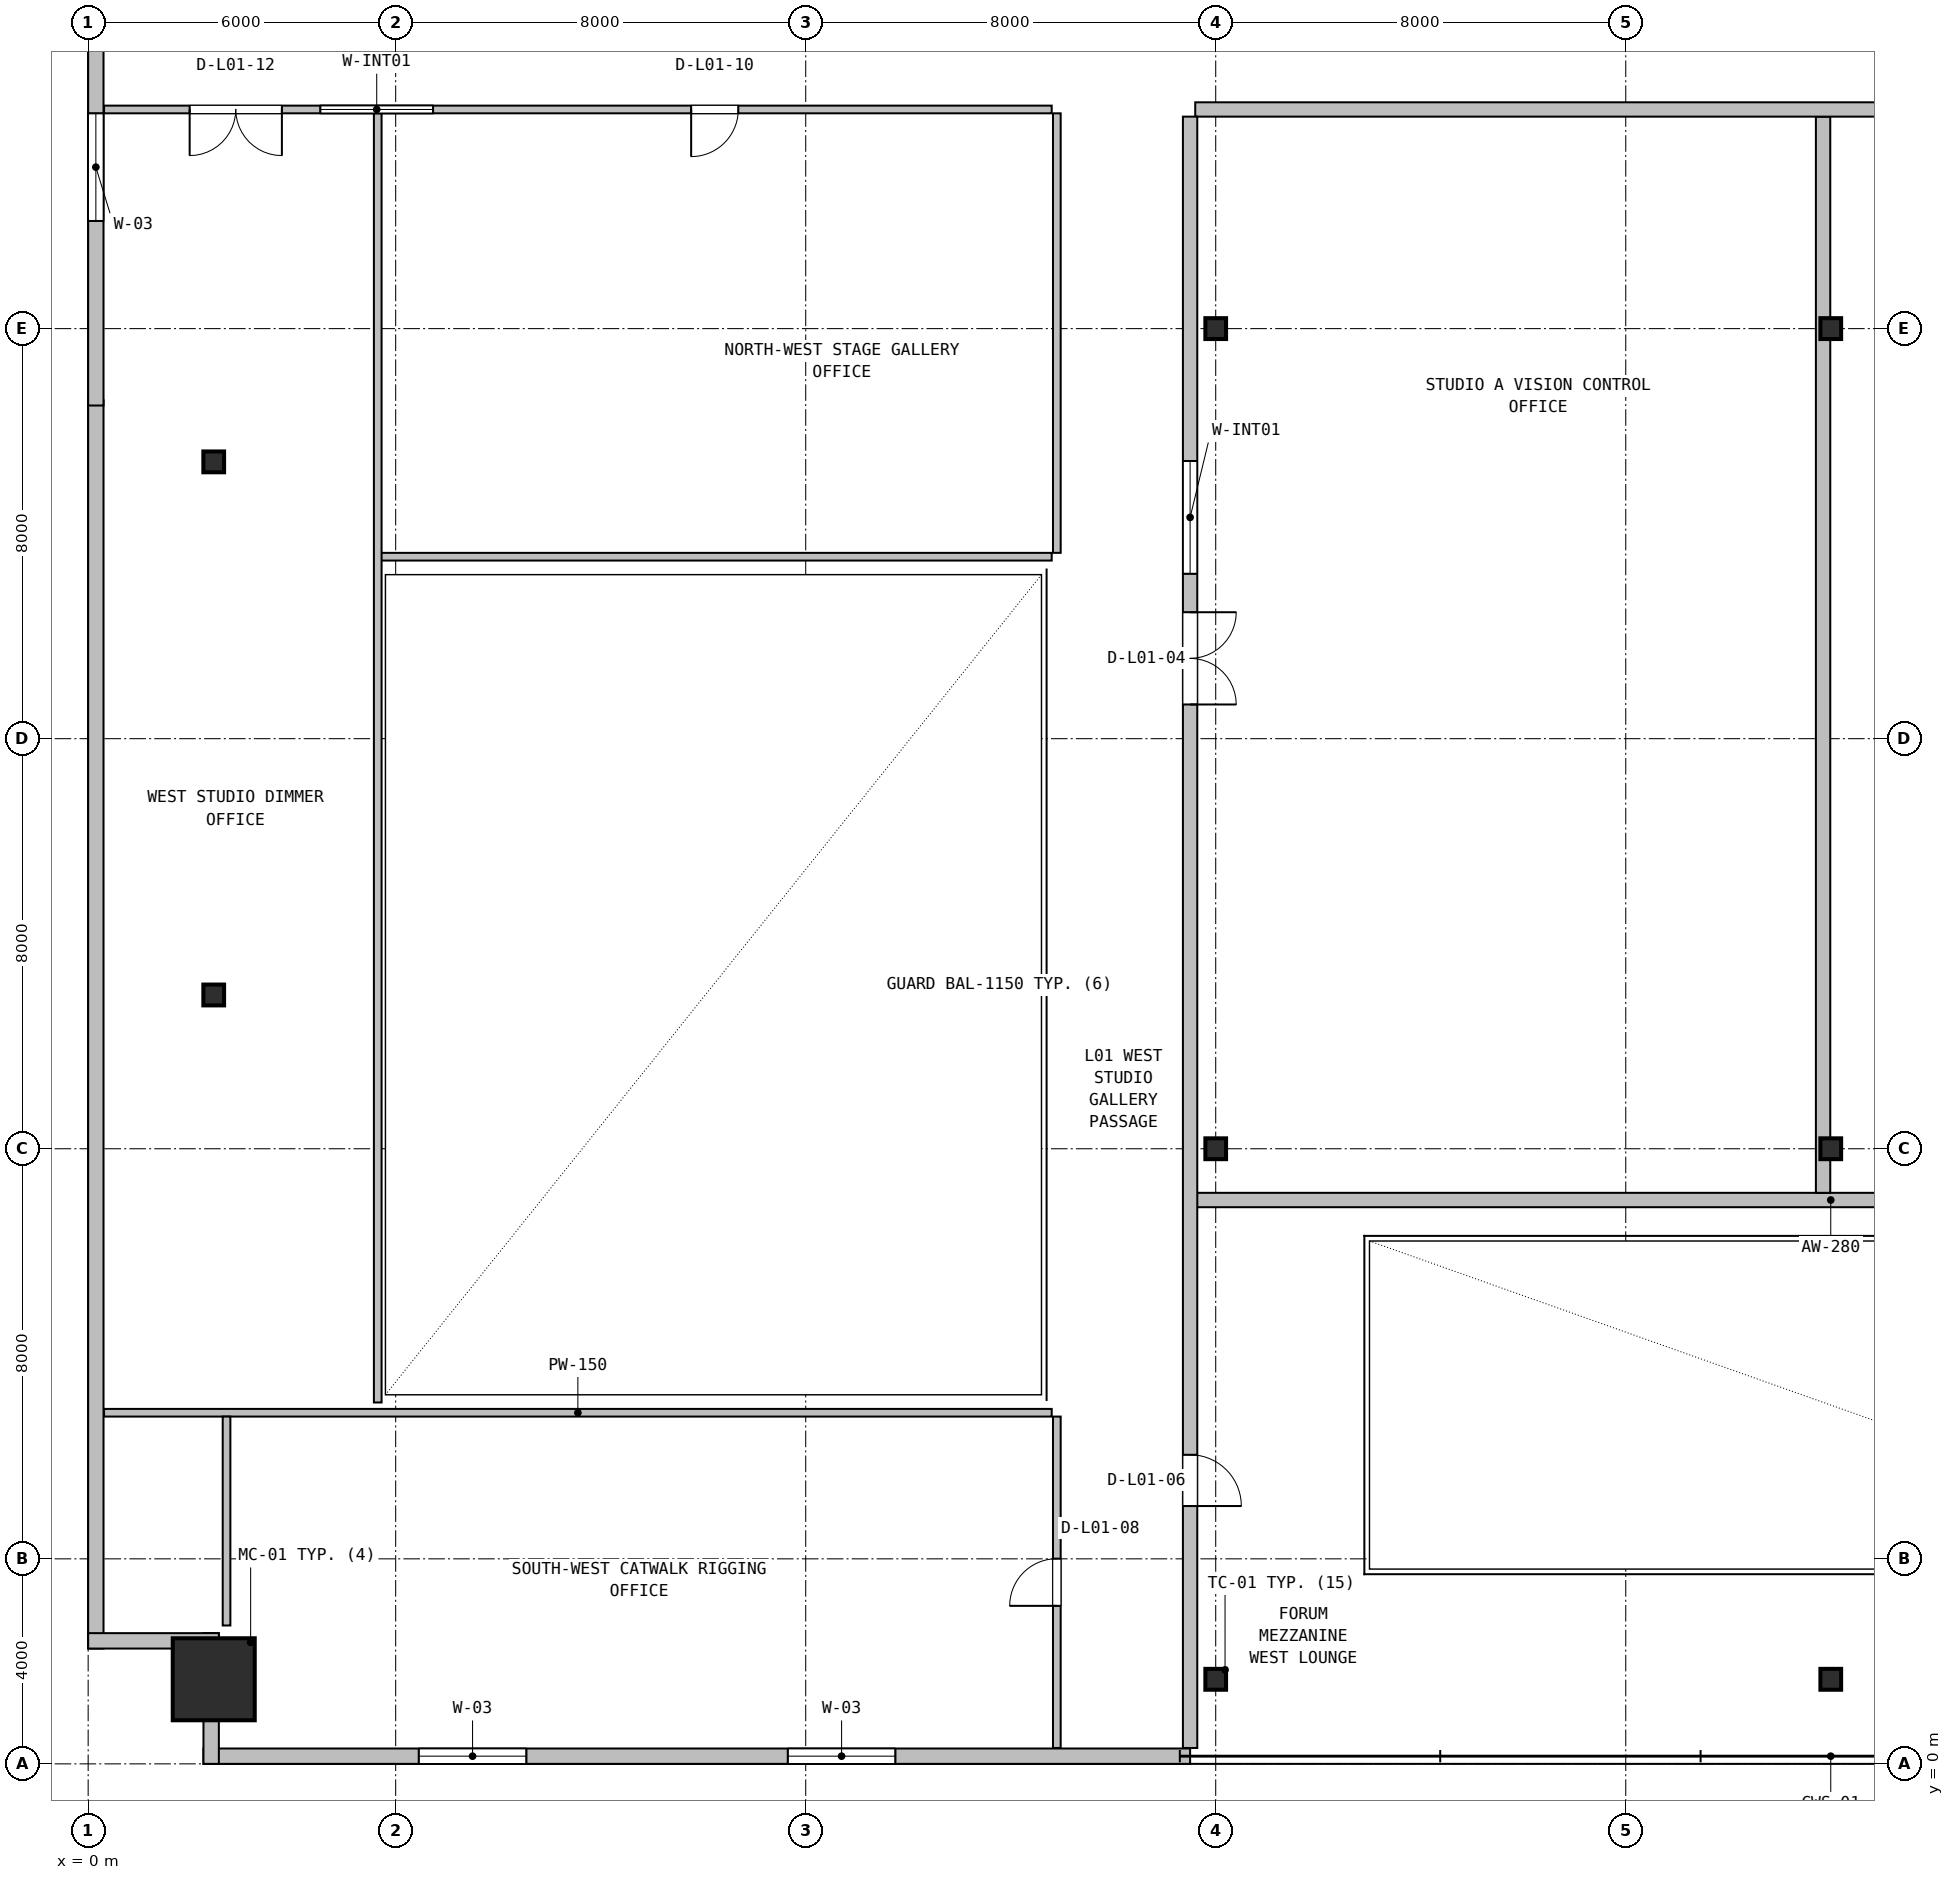
"""IFC4 building model, lengths in metres.
Left out: names, types, materials, properties, quantities, classifications, styles, units other than length and angle.
Written with IfcOpenShell. Run it as: python <this file> out.ifc"""

import sys

from ifc_helpers import new_model, si_unit, direction, frame, frame_2d, origin, origin_2d, place, context, subcontext, project, spatial, rectangle, hollow_rectangle, i_section, extrude, source, transform, mapped, element, fill, save


model = new_model("IFC4")
c1 = context("Model", 3, precision=1e-05, world=origin(), true_north=direction((0.0, 1.0)))
c2 = subcontext(c1, "Body", "Model", "MODEL_VIEW")
j1 = project(units=[si_unit("LENGTHUNIT", "METRE"), si_unit("PLANEANGLEUNIT", "RADIAN")], contexts=[c1])
p1 = place(None, origin())
s1 = spatial("IfcSite", under=j1, at=p1, CompositionType="ELEMENT")
p2 = place(p1, origin())
s2 = spatial("IfcBuilding", under=s1, at=p2, CompositionType="ELEMENT")
p3 = place(p2, frame((0.0, 0.0, 6.0)))
s3 = spatial("IfcBuildingStorey", under=s2, at=p3, CompositionType="ELEMENT", Elevation=6.0)
m1 = source(origin(), c2, "Body", "SweptSolid", [
    extrude(hollow_rectangle(XDim=1.6, YDim=1.6, WallThickness=0.06, at=origin_2d()), origin(), (0.0, 0.0, 1.0), 5.4),
])
p4 = place(p3, frame((2.45, 1.65, 0.0), z_axis=(0.0, 0.0, 1.0), x_axis=(1.0, 0.0, 0.0)))
e1 = element("IfcColumn", 1, at=p4, inside=s3, PredefinedType="COLUMN", context=c2, shape_type="MappedRepresentation", body=[
    mapped(m1, transform((0.0, 0.0, 0.0), x_axis=(1.0, 0.0, 0.0), y_axis=(0.0, 1.0, 0.0), z_axis=(0.0, 0.0, 1.0), scale=1.0)),
])
m2 = source(origin(), c2, "Body", "SweptSolid", [
    extrude(i_section(OverallWidth=0.404, OverallDepth=0.407, WebThickness=0.027, FlangeThickness=0.044, FilletRadius=0.018, at=origin_2d()), origin(), (0.0, 0.0, 1.0), 5.4),
])
for number, where, z_axis, x_axis in (
    (2, (22.0, 1.65, 0.0), (0.0, 0.0, 1.0), (1.0, 0.0, 0.0)),
    (3, (34.0, 1.65, 0.0), (0.0, 0.0, 1.0), (1.0, 0.0, 0.0)),
    (4, (22.0, 12.0, 0.0), (0.0, 0.0, 1.0), (1.0, 0.0, 0.0)),
    (5, (34.0, 12.0, 0.0), (0.0, 0.0, 1.0), (1.0, 0.0, 0.0)),
    (6, (22.0, 28.0, 0.0), (0.0, 0.0, 1.0), (1.0, 0.0, 0.0)),
    (7, (34.0, 28.0, 0.0), (0.0, 0.0, 1.0), (1.0, 0.0, 0.0)),
    (8, (2.45, 15.0, 0.0), (0.0, 0.0, 1.0), (1.0, 0.0, 0.0)),
    (9, (2.45, 25.4, 0.0), (0.0, 0.0, 1.0), (1.0, 0.0, 0.0)),
):
    element("IfcColumn", number, at=place(p3, frame(where, z_axis=z_axis, x_axis=x_axis)), inside=s3, PredefinedType="COLUMN", context=c2, shape_type="MappedRepresentation", body=[
        mapped(m2, transform((0.0, 0.0, 0.0), x_axis=(1.0, 0.0, 0.0), y_axis=(0.0, 1.0, 0.0), z_axis=(0.0, 0.0, 1.0), scale=1.0)),
    ])
p5 = place(p3, frame((2.25, 0.15, 0.0), z_axis=(0.0, 0.0, 1.0), x_axis=(1.0, 0.0, 0.0)))
e10 = element("IfcWall", 10, at=p5, inside=s3, PredefinedType="SOLIDWALL", context=c2, shape_type="SweptSolid", body=[
    extrude(rectangle(XDim=19.25, YDim=0.3, at=frame_2d((9.625, 0.0))), origin(), (0.0, 0.0, 1.0), 5.1),
])
p6 = place(p5, frame((4.2, 0.0, 0.9)))
e11 = element("IfcOpeningElement", 11, at=p6, cuts=e10, PredefinedType="OPENING", context=c2, shape_type="SweptSolid", body=[
    extrude(rectangle(XDim=2.1, YDim=2.1, at=frame_2d((1.05, 1.05))), frame((0.0, 0.16, 0.0), z_axis=(0.0, -1.0, 0.0), x_axis=(1.0, 0.0, 0.0)), (0.0, 0.0, 1.0), 0.32),
])
p7 = place(p5, frame((11.4, 0.0, 0.9)))
e12 = element("IfcOpeningElement", 12, at=p7, cuts=e10, PredefinedType="OPENING", context=c2, shape_type="SweptSolid", body=[
    extrude(rectangle(XDim=2.1, YDim=2.1, at=frame_2d((1.05, 1.05))), frame((0.0, 0.16, 0.0), z_axis=(0.0, -1.0, 0.0), x_axis=(1.0, 0.0, 0.0)), (0.0, 0.0, 1.0), 0.32),
])
p8 = place(p3, frame((0.15, 2.25, 0.0), z_axis=(0.0, 0.0, 1.0), x_axis=(0.0, 1.0, 0.0)))
e13 = element("IfcWall", 13, at=p8, inside=s3, PredefinedType="SOLIDWALL", context=c2, shape_type="SweptSolid", body=[
    extrude(rectangle(XDim=24.35, YDim=0.3, at=frame_2d((12.175, 0.0))), origin(), (0.0, 0.0, 1.0), 5.1),
])
p9 = place(p3, frame((0.15, 26.5, 0.0), z_axis=(0.0, 0.0, 1.0), x_axis=(0.0, 1.0, 0.0)))
e14 = element("IfcWall", 14, at=p9, inside=s3, PredefinedType="SOLIDWALL", context=c2, shape_type="SweptSolid", body=[
    extrude(rectangle(XDim=19.25, YDim=0.3, at=frame_2d((9.625, 0.0))), origin(), (0.0, 0.0, 1.0), 5.1),
])
p10 = place(p9, frame((3.6, 0.0, 0.9)))
e15 = element("IfcOpeningElement", 15, at=p10, cuts=e14, PredefinedType="OPENING", context=c2, shape_type="SweptSolid", body=[
    extrude(rectangle(XDim=2.1, YDim=2.1, at=frame_2d((1.05, 1.05))), frame((0.0, 0.16, 0.0), z_axis=(0.0, -1.0, 0.0), x_axis=(1.0, 0.0, 0.0)), (0.0, 0.0, 1.0), 0.32),
])
p11 = place(p9, frame((12.8, 0.0, 0.9)))
e16 = element("IfcOpeningElement", 16, at=p11, cuts=e14, PredefinedType="OPENING", context=c2, shape_type="SweptSolid", body=[
    extrude(rectangle(XDim=2.1, YDim=2.1, at=frame_2d((1.05, 1.05))), frame((0.0, 0.16, 0.0), z_axis=(0.0, -1.0, 0.0), x_axis=(1.0, 0.0, 0.0)), (0.0, 0.0, 1.0), 0.32),
])
for number, where, z_axis, x_axis in (
    (17, (2.4, 0.0, 0.0), (0.0, 0.0, 1.0), (0.0, 1.0, 0.0)),
    (18, (0.0, 2.4, 0.0), (0.0, 0.0, 1.0), (1.0, 0.0, 0.0)),
):
    element("IfcWall", number, at=place(p3, frame(where, z_axis=z_axis, x_axis=x_axis)), inside=s3, PredefinedType="SOLIDWALL", context=c2, shape_type="SweptSolid", body=[
        extrude(rectangle(XDim=2.55, YDim=0.3, at=frame_2d((1.275, 0.0))), origin(), (0.0, 0.0, 1.0), 4.183),
    ])
p12 = place(p3, frame((21.6, 11.0, 0.0), z_axis=(0.0, 0.0, 1.0), x_axis=(1.0, 0.0, 0.0)))
e19 = element("IfcWall", 19, at=p12, inside=s3, PredefinedType="SOLIDWALL", context=c2, shape_type="SweptSolid", body=[
    extrude(rectangle(XDim=24.8, YDim=0.28, at=frame_2d((12.4, 0.0))), origin(), (0.0, 0.0, 1.0), 4.183),
])
p13 = place(p3, frame((33.85, 11.14, 0.0), z_axis=(0.0, 0.0, 1.0), x_axis=(0.0, 1.0, 0.0)))
e20 = element("IfcWall", 20, at=p13, inside=s3, PredefinedType="SOLIDWALL", context=c2, shape_type="SweptSolid", body=[
    extrude(rectangle(XDim=20.995, YDim=0.28, at=frame_2d((10.498, 0.0))), origin(), (0.0, 0.0, 1.0), 4.183),
])
p14 = place(p3, frame((21.6, 32.275, 0.0), z_axis=(0.0, 0.0, 1.0), x_axis=(1.0, 0.0, 0.0)))
e21 = element("IfcWall", 21, at=p14, inside=s3, PredefinedType="SOLIDWALL", context=c2, shape_type="SweptSolid", body=[
    extrude(rectangle(XDim=24.8, YDim=0.28, at=frame_2d((12.4, 0.0))), origin(), (0.0, 0.0, 1.0), 4.183),
])
p15 = place(p3, frame((21.5, 0.31, 0.0), z_axis=(0.0, 0.0, 1.0), x_axis=(0.0, 1.0, 0.0)))
e22 = element("IfcWall", 22, at=p15, inside=s3, PredefinedType="SOLIDWALL", context=c2, shape_type="SweptSolid", body=[
    extrude(rectangle(XDim=31.825, YDim=0.28, at=frame_2d((15.913, 0.0))), origin(), (0.0, 0.0, 1.0), 4.183),
])
p16 = place(p15, frame((20.357, 0.0, 0.0)))
e23 = element("IfcOpeningElement", 23, at=p16, cuts=e22, PredefinedType="OPENING", context=c2, shape_type="SweptSolid", body=[
    extrude(rectangle(XDim=1.8, YDim=2.25, at=frame_2d((0.9, 1.125))), frame((0.0, 0.15, 0.0), z_axis=(0.0, -1.0, 0.0), x_axis=(1.0, 0.0, 0.0)), (0.0, 0.0, 1.0), 0.3),
])
p17 = place(p15, frame((22.907, 0.0, 0.95)))
e24 = element("IfcOpeningElement", 24, at=p17, cuts=e22, PredefinedType="OPENING", context=c2, shape_type="SweptSolid", body=[
    extrude(rectangle(XDim=2.2, YDim=1.3, at=frame_2d((1.1, 0.65))), frame((0.0, 0.15, 0.0), z_axis=(0.0, -1.0, 0.0), x_axis=(1.0, 0.0, 0.0)), (0.0, 0.0, 1.0), 0.3),
])
p18 = place(p15, frame((4.72, 0.0, 0.0)))
e25 = element("IfcOpeningElement", 25, at=p18, cuts=e22, PredefinedType="OPENING", context=c2, shape_type="SweptSolid", body=[
    extrude(rectangle(XDim=1.0, YDim=2.1, at=frame_2d((0.5, 1.05))), frame((0.0, 0.15, 0.0), z_axis=(0.0, -1.0, 0.0), x_axis=(1.0, 0.0, 0.0)), (0.0, 0.0, 1.0), 0.3),
])
p19 = place(p3, frame((18.9, 0.31, 0.0), z_axis=(0.0, 0.0, 1.0), x_axis=(0.0, 1.0, 0.0)))
e26 = element("IfcWall", 26, at=p19, inside=s3, PredefinedType="PARTITIONING", context=c2, shape_type="SweptSolid", body=[
    extrude(rectangle(XDim=6.465, YDim=0.15, at=frame_2d((3.232, 0.0))), origin(), (0.0, 0.0, 1.0), 4.183),
])
p20 = place(p19, frame((2.773, 0.0, 0.0)))
e27 = element("IfcOpeningElement", 27, at=p20, cuts=e26, PredefinedType="OPENING", context=c2, shape_type="SweptSolid", body=[
    extrude(rectangle(XDim=0.92, YDim=2.08, at=frame_2d((0.46, 1.04))), frame((0.0, 0.085, 0.0), z_axis=(0.0, -1.0, 0.0), x_axis=(1.0, 0.0, 0.0)), (0.0, 0.0, 1.0), 0.17),
])
p21 = place(p3, frame((0.31, 6.85, 0.0), z_axis=(0.0, 0.0, 1.0), x_axis=(1.0, 0.0, 0.0)))
e28 = element("IfcWall", 28, at=p21, inside=s3, PredefinedType="PARTITIONING", context=c2, shape_type="SweptSolid", body=[
    extrude(rectangle(XDim=18.49, YDim=0.15, at=frame_2d((9.245, 0.0))), origin(), (0.0, 0.0, 1.0), 4.183),
])
p22 = place(p3, frame((2.7, 2.7, 0.0), z_axis=(0.0, 0.0, 1.0), x_axis=(0.0, 1.0, 0.0)))
e29 = element("IfcWall", 29, at=p22, inside=s3, PredefinedType="PARTITIONING", context=c2, shape_type="SweptSolid", body=[
    extrude(rectangle(XDim=4.075, YDim=0.15, at=frame_2d((2.038, 0.0))), origin(), (0.0, 0.0, 1.0), 4.183),
])
p23 = place(p3, frame((5.65, 23.55, 0.0), z_axis=(0.0, 0.0, 1.0), x_axis=(1.0, 0.0, 0.0)))
e30 = element("IfcWall", 30, at=p23, inside=s3, PredefinedType="PARTITIONING", context=c2, shape_type="SweptSolid", body=[
    extrude(rectangle(XDim=13.15, YDim=0.15, at=frame_2d((6.575, 0.0))), origin(), (0.0, 0.0, 1.0), 5.1),
])
p24 = place(p3, frame((18.9, 23.625, 0.0), z_axis=(0.0, 0.0, 1.0), x_axis=(0.0, 1.0, 0.0)))
e31 = element("IfcWall", 31, at=p24, inside=s3, PredefinedType="PARTITIONING", context=c2, shape_type="SweptSolid", body=[
    extrude(rectangle(XDim=8.575, YDim=0.15, at=frame_2d((4.288, 0.0))), origin(), (0.0, 0.0, 1.0), 4.183),
])
p25 = place(p3, frame((0.31, 32.275, 0.0), z_axis=(0.0, 0.0, 1.0), x_axis=(1.0, 0.0, 0.0)))
e32 = element("IfcWall", 32, at=p25, inside=s3, PredefinedType="PARTITIONING", context=c2, shape_type="SweptSolid", body=[
    extrude(rectangle(XDim=18.49, YDim=0.15, at=frame_2d((9.245, 0.0))), origin(), (0.0, 0.0, 1.0), 4.183),
])
p26 = place(p25, frame((11.455, 0.0, 0.0)))
e33 = element("IfcOpeningElement", 33, at=p26, cuts=e32, PredefinedType="OPENING", context=c2, shape_type="SweptSolid", body=[
    extrude(rectangle(XDim=0.92, YDim=2.08, at=frame_2d((0.46, 1.04))), frame((0.0, 0.085, 0.0), z_axis=(0.0, -1.0, 0.0), x_axis=(1.0, 0.0, 0.0)), (0.0, 0.0, 1.0), 0.17),
])
p27 = place(p25, frame((1.67, 0.0, 0.0)))
e34 = element("IfcOpeningElement", 34, at=p27, cuts=e32, PredefinedType="OPENING", context=c2, shape_type="SweptSolid", body=[
    extrude(rectangle(XDim=1.8, YDim=2.25, at=frame_2d((0.9, 1.125))), frame((0.0, 0.085, 0.0), z_axis=(0.0, -1.0, 0.0), x_axis=(1.0, 0.0, 0.0)), (0.0, 0.0, 1.0), 0.17),
])
p28 = place(p25, frame((4.22, 0.0, 0.95)))
e35 = element("IfcOpeningElement", 35, at=p28, cuts=e32, PredefinedType="OPENING", context=c2, shape_type="SweptSolid", body=[
    extrude(rectangle(XDim=2.2, YDim=1.3, at=frame_2d((1.1, 0.65))), frame((0.0, 0.085, 0.0), z_axis=(0.0, -1.0, 0.0), x_axis=(1.0, 0.0, 0.0)), (0.0, 0.0, 1.0), 0.17),
])
p29 = place(p3, frame((5.65, 7.05, 0.0), z_axis=(0.0, 0.0, 1.0), x_axis=(0.0, 1.0, 0.0)))
e36 = element("IfcWall", 36, at=p29, inside=s3, PredefinedType="PARTITIONING", context=c2, shape_type="SweptSolid", body=[
    extrude(rectangle(XDim=25.15, YDim=0.15, at=frame_2d((12.575, 0.0))), origin(), (0.0, 0.0, 1.0), 4.183),
])
m3 = source(origin(), c2, "Body", "SweptSolid", [
    extrude(rectangle(XDim=2.1, YDim=2.1, at=frame_2d((1.05, 1.05))), frame((0.0, 0.03, 0.0), z_axis=(0.0, -1.0, 0.0), x_axis=(1.0, 0.0, 0.0)), (0.0, 0.0, 1.0), 0.06),
])
p30 = place(p6, origin())
e37 = element("IfcWindow", 37, at=p30, inside=s3, PartitioningType="DOUBLE_PANEL_VERTICAL", PredefinedType="WINDOW", context=c2, shape_type="MappedRepresentation", body=[
    mapped(m3, transform((0.0, 0.0, 0.0), x_axis=(1.0, 0.0, 0.0), y_axis=(0.0, 1.0, 0.0), z_axis=(0.0, 0.0, 1.0), scale=1.0)),
])
fill(e11, e37)
p31 = place(p7, origin())
e38 = element("IfcWindow", 38, at=p31, inside=s3, PartitioningType="DOUBLE_PANEL_VERTICAL", PredefinedType="WINDOW", context=c2, shape_type="MappedRepresentation", body=[
    mapped(m3, transform((0.0, 0.0, 0.0), x_axis=(1.0, 0.0, 0.0), y_axis=(0.0, 1.0, 0.0), z_axis=(0.0, 0.0, 1.0), scale=1.0)),
])
fill(e12, e38)
p32 = place(p10, origin())
e39 = element("IfcWindow", 39, at=p32, inside=s3, PartitioningType="DOUBLE_PANEL_VERTICAL", PredefinedType="WINDOW", context=c2, shape_type="MappedRepresentation", body=[
    mapped(m3, transform((0.0, 0.0, 0.0), x_axis=(1.0, 0.0, 0.0), y_axis=(0.0, 1.0, 0.0), z_axis=(0.0, 0.0, 1.0), scale=1.0)),
])
fill(e15, e39)
m4 = source(origin(), c2, "Body", "SweptSolid", [
    extrude(rectangle(XDim=1.8, YDim=2.25, at=frame_2d((0.9, 1.125))), frame((0.0, 0.025, 0.0), z_axis=(0.0, -1.0, 0.0), x_axis=(1.0, 0.0, 0.0)), (0.0, 0.0, 1.0), 0.05),
])
p33 = place(p16, frame((1.8, 0.0, 0.0), z_axis=(0.0, 0.0, 1.0), x_axis=(-1.0, 0.0, 0.0)))
e40 = element("IfcDoor", 40, at=p33, inside=s3, OperationType="DOUBLE_DOOR_SINGLE_SWING", PredefinedType="DOOR", context=c2, shape_type="MappedRepresentation", body=[
    mapped(m4, transform((0.0, 0.0, 0.0), x_axis=(1.0, 0.0, 0.0), y_axis=(0.0, 1.0, 0.0), z_axis=(0.0, 0.0, 1.0), scale=1.0)),
])
fill(e23, e40)
m5 = source(origin(), c2, "Body", "SweptSolid", [
    extrude(rectangle(XDim=2.2, YDim=1.3, at=frame_2d((1.1, 0.65))), frame((0.0, 0.03, 0.0), z_axis=(0.0, -1.0, 0.0), x_axis=(1.0, 0.0, 0.0)), (0.0, 0.0, 1.0), 0.06),
])
p34 = place(p17, origin())
e41 = element("IfcWindow", 41, at=p34, inside=s3, PartitioningType="SINGLE_PANEL", PredefinedType="WINDOW", context=c2, shape_type="MappedRepresentation", body=[
    mapped(m5, transform((0.0, 0.0, 0.0), x_axis=(1.0, 0.0, 0.0), y_axis=(0.0, 1.0, 0.0), z_axis=(0.0, 0.0, 1.0), scale=1.0)),
])
fill(e24, e41)
m6 = source(origin(), c2, "Body", "SweptSolid", [
    extrude(rectangle(XDim=1.0, YDim=2.1, at=frame_2d((0.5, 1.05))), frame((0.0, 0.025, 0.0), z_axis=(0.0, -1.0, 0.0), x_axis=(1.0, 0.0, 0.0)), (0.0, 0.0, 1.0), 0.05),
])
p35 = place(p18, frame((1.0, 0.0, 0.0), z_axis=(0.0, 0.0, 1.0), x_axis=(-1.0, 0.0, 0.0)))
e42 = element("IfcDoor", 42, at=p35, inside=s3, OperationType="SINGLE_SWING_LEFT", PredefinedType="DOOR", context=c2, shape_type="MappedRepresentation", body=[
    mapped(m6, transform((0.0, 0.0, 0.0), x_axis=(1.0, 0.0, 0.0), y_axis=(0.0, 1.0, 0.0), z_axis=(0.0, 0.0, 1.0), scale=1.0)),
])
fill(e25, e42)
m7 = source(origin(), c2, "Body", "SweptSolid", [
    extrude(rectangle(XDim=0.92, YDim=2.08, at=frame_2d((0.46, 1.04))), frame((0.0, 0.025, 0.0), z_axis=(0.0, -1.0, 0.0), x_axis=(1.0, 0.0, 0.0)), (0.0, 0.0, 1.0), 0.05),
])
p36 = place(p20, origin())
e43 = element("IfcDoor", 43, at=p36, inside=s3, OperationType="SINGLE_SWING_LEFT", PredefinedType="DOOR", context=c2, shape_type="MappedRepresentation", body=[
    mapped(m7, transform((0.0, 0.0, 0.0), x_axis=(1.0, 0.0, 0.0), y_axis=(0.0, 1.0, 0.0), z_axis=(0.0, 0.0, 1.0), scale=1.0)),
])
fill(e27, e43)
p37 = place(p26, frame((0.92, 0.0, 0.0), z_axis=(0.0, 0.0, 1.0), x_axis=(-1.0, 0.0, 0.0)))
e44 = element("IfcDoor", 44, at=p37, inside=s3, OperationType="SINGLE_SWING_LEFT", PredefinedType="DOOR", context=c2, shape_type="MappedRepresentation", body=[
    mapped(m7, transform((0.0, 0.0, 0.0), x_axis=(1.0, 0.0, 0.0), y_axis=(0.0, 1.0, 0.0), z_axis=(0.0, 0.0, 1.0), scale=1.0)),
])
fill(e33, e44)
p38 = place(p27, frame((1.8, 0.0, 0.0), z_axis=(0.0, 0.0, 1.0), x_axis=(-1.0, 0.0, 0.0)))
e45 = element("IfcDoor", 45, at=p38, inside=s3, OperationType="DOUBLE_DOOR_SINGLE_SWING", PredefinedType="DOOR", context=c2, shape_type="MappedRepresentation", body=[
    mapped(m4, transform((0.0, 0.0, 0.0), x_axis=(1.0, 0.0, 0.0), y_axis=(0.0, 1.0, 0.0), z_axis=(0.0, 0.0, 1.0), scale=1.0)),
])
fill(e34, e45)
p39 = place(p28, origin())
e46 = element("IfcWindow", 46, at=p39, inside=s3, PartitioningType="SINGLE_PANEL", PredefinedType="WINDOW", context=c2, shape_type="MappedRepresentation", body=[
    mapped(m5, transform((0.0, 0.0, 0.0), x_axis=(1.0, 0.0, 0.0), y_axis=(0.0, 1.0, 0.0), z_axis=(0.0, 0.0, 1.0), scale=1.0)),
])
fill(e35, e46)
save(model, sys.argv[1])
